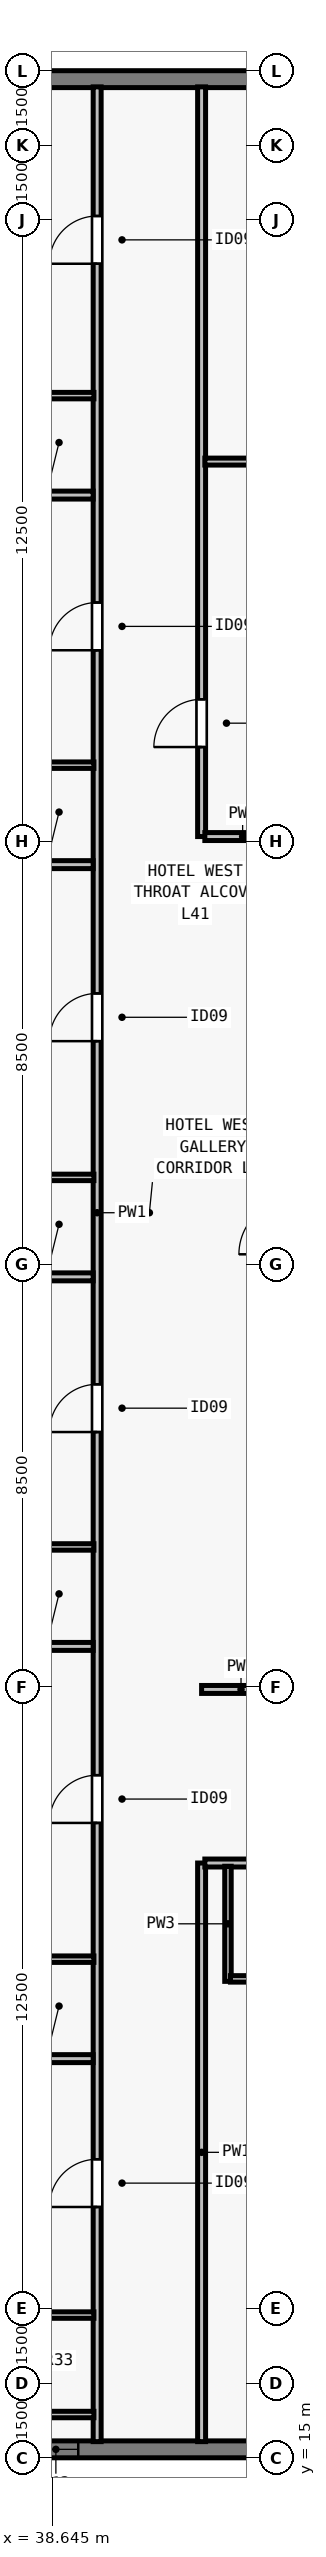
"""IFC4 building model, lengths in metres.
Left out: names, types, materials, properties, quantities, classifications, styles, units other than length and angle.
Written with IfcOpenShell. Run it as: python <this file> out.ifc"""

import sys

from ifc_helpers import new_model, si_unit, direction, frame, frame_2d, origin, place, context, subcontext, project, spatial, rectangle, extrude, element, fill, save


model = new_model("IFC4")
c1 = context("Model", 3, precision=1e-05, world=origin(), true_north=direction((0.0, 1.0)))
c2 = subcontext(c1, "Body", "Model", "MODEL_VIEW")
j1 = project(units=[si_unit("LENGTHUNIT", "METRE"), si_unit("PLANEANGLEUNIT", "RADIAN")], contexts=[c1])
p1 = place(None, origin())
s1 = spatial("IfcSite", under=j1, at=p1, CompositionType="ELEMENT")
p2 = place(p1, origin())
s2 = spatial("IfcBuilding", under=s1, at=p2, CompositionType="ELEMENT")
p3 = place(p2, frame((0.0, 0.0, 151.5)))
s3 = spatial("IfcBuildingStorey", under=s2, at=p3, CompositionType="ELEMENT", Elevation=151.5)
p4 = place(p3, frame((47.8, 15.17, 0.0), z_axis=(0.0, 0.0, 1.0), x_axis=(-1.0, 0.0, 0.0)))
e1 = element("IfcWall", 1, at=p4, inside=s3, PredefinedType="SOLIDWALL", context=c2, shape_type="SweptSolid", body=[
    extrude(rectangle(XDim=15.482, YDim=0.34, at=frame_2d((7.741, 0.0))), origin(), (0.0, 0.0, 1.0), 3.28),
])
p5 = place(p4, frame((2.105, 0.0, 0.8)))
e2 = element("IfcOpeningElement", 2, at=p5, cuts=e1, PredefinedType="OPENING", context=c2, shape_type="SweptSolid", body=[
    extrude(rectangle(XDim=1.75, YDim=1.66, at=frame_2d((0.875, 0.83))), frame((0.0, 0.18, 0.0), z_axis=(0.0, -1.0, 0.0), x_axis=(1.0, 0.0, 0.0)), (0.0, 0.0, 1.0), 0.36),
])
p6 = place(p4, frame((8.63, 0.0, 0.8)))
e3 = element("IfcOpeningElement", 3, at=p6, cuts=e1, PredefinedType="OPENING", context=c2, shape_type="SweptSolid", body=[
    extrude(rectangle(XDim=0.9, YDim=1.66, at=frame_2d((0.45, 0.83))), frame((0.0, 0.18, 0.0), z_axis=(0.0, -1.0, 0.0), x_axis=(1.0, 0.0, 0.0)), (0.0, 0.0, 1.0), 0.36),
])
p7 = place(p3, frame((32.0, 62.83, 0.0), z_axis=(0.0, 0.0, 1.0), x_axis=(1.0, 0.0, 0.0)))
e4 = element("IfcWall", 4, at=p7, inside=s3, PredefinedType="SOLIDWALL", context=c2, shape_type="SweptSolid", body=[
    extrude(rectangle(XDim=39.682, YDim=0.34, at=frame_2d((19.841, 0.0))), origin(), (0.0, 0.0, 1.0), 3.28),
])
p8 = place(p7, frame((4.752, 0.0, 0.8)))
e5 = element("IfcOpeningElement", 5, at=p8, cuts=e4, PredefinedType="OPENING", context=c2, shape_type="SweptSolid", body=[
    extrude(rectangle(XDim=1.75, YDim=1.66, at=frame_2d((0.875, 0.83))), frame((0.0, 0.18, 0.0), z_axis=(0.0, -1.0, 0.0), x_axis=(1.0, 0.0, 0.0)), (0.0, 0.0, 1.0), 0.36),
])
p9 = place(p7, frame((11.859, 0.0, 0.8)))
e6 = element("IfcOpeningElement", 6, at=p9, cuts=e4, PredefinedType="OPENING", context=c2, shape_type="SweptSolid", body=[
    extrude(rectangle(XDim=1.75, YDim=1.66, at=frame_2d((0.875, 0.83))), frame((0.0, 0.18, 0.0), z_axis=(0.0, -1.0, 0.0), x_axis=(1.0, 0.0, 0.0)), (0.0, 0.0, 1.0), 0.36),
])
p10 = place(p7, frame((16.062, 0.0, 0.8)))
e7 = element("IfcOpeningElement", 7, at=p10, cuts=e4, PredefinedType="OPENING", context=c2, shape_type="SweptSolid", body=[
    extrude(rectangle(XDim=1.35, YDim=1.66, at=frame_2d((0.675, 0.83))), frame((0.0, 0.18, 0.0), z_axis=(0.0, -1.0, 0.0), x_axis=(1.0, 0.0, 0.0)), (0.0, 0.0, 1.0), 0.36),
])
p11 = place(p7, frame((17.716, 0.0, 0.8)))
e8 = element("IfcOpeningElement", 8, at=p11, cuts=e4, PredefinedType="OPENING", context=c2, shape_type="SweptSolid", body=[
    extrude(rectangle(XDim=1.75, YDim=1.66, at=frame_2d((0.875, 0.83))), frame((0.0, 0.18, 0.0), z_axis=(0.0, -1.0, 0.0), x_axis=(1.0, 0.0, 0.0)), (0.0, 0.0, 1.0), 0.36),
])
p12 = place(p7, frame((22.719, 0.0, 0.8)))
e9 = element("IfcOpeningElement", 9, at=p12, cuts=e4, PredefinedType="OPENING", context=c2, shape_type="SweptSolid", body=[
    extrude(rectangle(XDim=1.35, YDim=1.66, at=frame_2d((0.675, 0.83))), frame((0.0, 0.18, 0.0), z_axis=(0.0, -1.0, 0.0), x_axis=(1.0, 0.0, 0.0)), (0.0, 0.0, 1.0), 0.36),
])
p13 = place(p7, frame((26.073, 0.0, 0.8)))
e10 = element("IfcOpeningElement", 10, at=p13, cuts=e4, PredefinedType="OPENING", context=c2, shape_type="SweptSolid", body=[
    extrude(rectangle(XDim=1.75, YDim=1.66, at=frame_2d((0.875, 0.83))), frame((0.0, 0.18, 0.0), z_axis=(0.0, -1.0, 0.0), x_axis=(1.0, 0.0, 0.0)), (0.0, 0.0, 1.0), 0.36),
])
p14 = place(p7, frame((29.827, 0.0, 0.8)))
e11 = element("IfcOpeningElement", 11, at=p14, cuts=e4, PredefinedType="OPENING", context=c2, shape_type="SweptSolid", body=[
    extrude(rectangle(XDim=1.35, YDim=1.66, at=frame_2d((0.675, 0.83))), frame((0.0, 0.18, 0.0), z_axis=(0.0, -1.0, 0.0), x_axis=(1.0, 0.0, 0.0)), (0.0, 0.0, 1.0), 0.36),
])
p15 = place(p3, frame((39.55, 15.325, 0.0), z_axis=(0.0, 0.0, 1.0), x_axis=(0.0, 1.0, 0.0)))
e12 = element("IfcWall", 12, at=p15, inside=s3, PredefinedType="PARTITIONING", context=c2, shape_type="SweptSolid", body=[
    extrude(rectangle(XDim=47.35, YDim=0.16, at=frame_2d((23.675, 0.0))), origin(), (0.0, 0.0, 1.0), 2.555),
])
p16 = place(p15, frame((4.718, 0.0, 0.0)))
e13 = element("IfcOpeningElement", 13, at=p16, cuts=e12, PredefinedType="OPENING", context=c2, shape_type="SweptSolid", body=[
    extrude(rectangle(XDim=0.96, YDim=2.15, at=frame_2d((0.48, 1.075))), frame((0.0, 0.09, 0.0), z_axis=(0.0, -1.0, 0.0), x_axis=(1.0, 0.0, 0.0)), (0.0, 0.0, 1.0), 0.18),
])
p17 = place(p15, frame((12.441, 0.0, 0.0)))
e14 = element("IfcOpeningElement", 14, at=p17, cuts=e12, PredefinedType="OPENING", context=c2, shape_type="SweptSolid", body=[
    extrude(rectangle(XDim=0.96, YDim=2.15, at=frame_2d((0.48, 1.075))), frame((0.0, 0.09, 0.0), z_axis=(0.0, -1.0, 0.0), x_axis=(1.0, 0.0, 0.0)), (0.0, 0.0, 1.0), 0.18),
])
p18 = place(p15, frame((20.301, 0.0, 0.0)))
e15 = element("IfcOpeningElement", 15, at=p18, cuts=e12, PredefinedType="OPENING", context=c2, shape_type="SweptSolid", body=[
    extrude(rectangle(XDim=0.96, YDim=2.15, at=frame_2d((0.48, 1.075))), frame((0.0, 0.09, 0.0), z_axis=(0.0, -1.0, 0.0), x_axis=(1.0, 0.0, 0.0)), (0.0, 0.0, 1.0), 0.18),
])
p19 = place(p15, frame((28.161, 0.0, 0.0)))
e16 = element("IfcOpeningElement", 16, at=p19, cuts=e12, PredefinedType="OPENING", context=c2, shape_type="SweptSolid", body=[
    extrude(rectangle(XDim=0.96, YDim=2.15, at=frame_2d((0.48, 1.075))), frame((0.0, 0.09, 0.0), z_axis=(0.0, -1.0, 0.0), x_axis=(1.0, 0.0, 0.0)), (0.0, 0.0, 1.0), 0.18),
])
p20 = place(p15, frame((36.021, 0.0, 0.0)))
e17 = element("IfcOpeningElement", 17, at=p20, cuts=e12, PredefinedType="OPENING", context=c2, shape_type="SweptSolid", body=[
    extrude(rectangle(XDim=0.96, YDim=2.15, at=frame_2d((0.48, 1.075))), frame((0.0, 0.09, 0.0), z_axis=(0.0, -1.0, 0.0), x_axis=(1.0, 0.0, 0.0)), (0.0, 0.0, 1.0), 0.18),
])
p21 = place(p15, frame((43.793, 0.0, 0.0)))
e18 = element("IfcOpeningElement", 18, at=p21, cuts=e12, PredefinedType="OPENING", context=c2, shape_type="SweptSolid", body=[
    extrude(rectangle(XDim=0.96, YDim=2.15, at=frame_2d((0.48, 1.075))), frame((0.0, 0.09, 0.0), z_axis=(0.0, -1.0, 0.0), x_axis=(1.0, 0.0, 0.0)), (0.0, 0.0, 1.0), 0.18),
])
p22 = place(p3, frame((41.65, 15.325, 0.0), z_axis=(0.0, 0.0, 1.0), x_axis=(0.0, 1.0, 0.0)))
e19 = element("IfcWall", 19, at=p22, inside=s3, PredefinedType="PARTITIONING", context=c2, shape_type="SweptSolid", body=[
    extrude(rectangle(XDim=11.635, YDim=0.16, at=frame_2d((5.817, 0.0))), origin(), (0.0, 0.0, 1.0), 3.28),
])
p23 = place(p3, frame((41.65, 47.6, 0.0), z_axis=(0.0, 0.0, 1.0), x_axis=(0.0, 1.0, 0.0)))
e20 = element("IfcWall", 20, at=p23, inside=s3, PredefinedType="PARTITIONING", context=c2, shape_type="SweptSolid", body=[
    extrude(rectangle(XDim=15.075, YDim=0.16, at=frame_2d((7.538, 0.0))), origin(), (0.0, 0.0, 1.0), 2.555),
])
p24 = place(p23, frame((1.8, 0.0, 0.0)))
e21 = element("IfcOpeningElement", 21, at=p24, cuts=e20, PredefinedType="OPENING", context=c2, shape_type="SweptSolid", body=[
    extrude(rectangle(XDim=0.96, YDim=2.12, at=frame_2d((0.48, 1.06))), frame((0.0, 0.09, 0.0), z_axis=(0.0, -1.0, 0.0), x_axis=(1.0, 0.0, 0.0)), (0.0, 0.0, 1.0), 0.18),
])
p25 = place(p3, frame((41.65, 30.45, 0.0), z_axis=(0.0, 0.0, 1.0), x_axis=(1.0, 0.0, 0.0)))
e22 = element("IfcWall", 22, at=p25, inside=s3, PredefinedType="PARTITIONING", context=c2, shape_type="SweptSolid", body=[
    extrude(rectangle(XDim=1.585, YDim=0.16, at=frame_2d((0.792, 0.0))), origin(), (0.0, 0.0, 1.0), 3.28),
])
p26 = place(p3, frame((41.715, 47.6, 0.0), z_axis=(0.0, 0.0, 1.0), x_axis=(1.0, 0.0, 0.0)))
e23 = element("IfcWall", 23, at=p26, inside=s3, PredefinedType="PARTITIONING", context=c2, shape_type="SweptSolid", body=[
    extrude(rectangle(XDim=1.52, YDim=0.16, at=frame_2d((0.76, 0.0))), origin(), (0.0, 0.0, 1.0), 3.28),
])
p27 = place(p3, frame((41.715, 26.96, 0.0), z_axis=(0.0, 0.0, 1.0), x_axis=(1.0, 0.0, 0.0)))
e24 = element("IfcWall", 24, at=p27, inside=s3, PredefinedType="PARTITIONING", context=c2, shape_type="SweptSolid", body=[
    extrude(rectangle(XDim=22.07, YDim=0.16, at=frame_2d((11.035, 0.0))), origin(), (0.0, 0.0, 1.0), 3.28),
])
p28 = place(p27, frame((6.15, 0.0, 0.0)))
e25 = element("IfcOpeningElement", 25, at=p28, cuts=e24, PredefinedType="OPENING", context=c2, shape_type="SweptSolid", body=[
    extrude(rectangle(XDim=0.96, YDim=2.15, at=frame_2d((0.48, 1.075))), frame((0.0, 0.09, 0.0), z_axis=(0.0, -1.0, 0.0), x_axis=(1.0, 0.0, 0.0)), (0.0, 0.0, 1.0), 0.18),
])
p29 = place(p27, frame((16.945, 0.0, 0.0)))
e26 = element("IfcOpeningElement", 26, at=p29, cuts=e24, PredefinedType="OPENING", context=c2, shape_type="SweptSolid", body=[
    extrude(rectangle(XDim=0.96, YDim=2.15, at=frame_2d((0.48, 1.075))), frame((0.0, 0.09, 0.0), z_axis=(0.0, -1.0, 0.0), x_axis=(1.0, 0.0, 0.0)), (0.0, 0.0, 1.0), 0.18),
])
p30 = place(p3, frame((41.715, 55.14, 0.0), z_axis=(0.0, 0.0, 1.0), x_axis=(1.0, 0.0, 0.0)))
e27 = element("IfcWall", 27, at=p30, inside=s3, PredefinedType="PARTITIONING", context=c2, shape_type="SweptSolid", body=[
    extrude(rectangle(XDim=22.07, YDim=0.14, at=frame_2d((11.035, 0.0))), origin(), (0.0, 0.0, 1.0), 3.28),
])
p31 = place(p30, frame((3.435, 0.0, 0.0)))
e28 = element("IfcOpeningElement", 28, at=p31, cuts=e27, PredefinedType="OPENING", context=c2, shape_type="SweptSolid", body=[
    extrude(rectangle(XDim=0.92, YDim=2.12, at=frame_2d((0.46, 1.06))), frame((0.0, 0.08, 0.0), z_axis=(0.0, -1.0, 0.0), x_axis=(1.0, 0.0, 0.0)), (0.0, 0.0, 1.0), 0.16),
])
p32 = place(p30, frame((14.435, 0.0, 0.0)))
e29 = element("IfcOpeningElement", 29, at=p32, cuts=e27, PredefinedType="OPENING", context=c2, shape_type="SweptSolid", body=[
    extrude(rectangle(XDim=0.92, YDim=2.12, at=frame_2d((0.46, 1.06))), frame((0.0, 0.08, 0.0), z_axis=(0.0, -1.0, 0.0), x_axis=(1.0, 0.0, 0.0)), (0.0, 0.0, 1.0), 0.16),
])
p33 = place(p3, frame((42.18, 24.58, 0.0), z_axis=(0.0, 0.0, 1.0), x_axis=(0.0, 1.0, 0.0)))
e30 = element("IfcWall", 30, at=p33, inside=s3, PredefinedType="PLUMBINGWALL", context=c2, shape_type="SweptSolid", body=[
    extrude(rectangle(XDim=2.315, YDim=0.13, at=frame_2d((1.157, 0.0))), origin(), (0.0, 0.0, 1.0), 3.28),
])
p34 = place(p3, frame((42.23, 24.63, 0.0), z_axis=(0.0, 0.0, 1.0), x_axis=(1.0, 0.0, 0.0)))
e31 = element("IfcWall", 31, at=p34, inside=s3, PredefinedType="PLUMBINGWALL", context=c2, shape_type="SweptSolid", body=[
    extrude(rectangle(XDim=1.9, YDim=0.13, at=frame_2d((0.95, 0.0))), origin(), (0.0, 0.0, 1.0), 3.28),
])
p35 = place(p34, frame((0.54, 0.0, 0.0)))
e32 = element("IfcOpeningElement", 32, at=p35, cuts=e31, PredefinedType="OPENING", context=c2, shape_type="SweptSolid", body=[
    extrude(rectangle(XDim=0.82, YDim=2.1, at=frame_2d((0.41, 1.05))), frame((0.0, 0.075, 0.0), z_axis=(0.0, -1.0, 0.0), x_axis=(1.0, 0.0, 0.0)), (0.0, 0.0, 1.0), 0.15),
])
for number, where, z_axis, x_axis in (
    (33, (37.17, 15.87, 0.0), (0.0, 0.0, 1.0), (1.0, 0.0, 0.0)),
    (34, (37.17, 17.87, 0.0), (0.0, 0.0, 1.0), (1.0, 0.0, 0.0)),
):
    element("IfcWall", number, at=place(p3, frame(where, z_axis=z_axis, x_axis=x_axis)), inside=s3, PredefinedType="PLUMBINGWALL", context=c2, shape_type="SweptSolid", body=[
        extrude(rectangle(XDim=2.315, YDim=0.13, at=frame_2d((1.158, 0.0))), origin(), (0.0, 0.0, 1.0), 3.28),
    ])
p36 = place(p3, frame((28.325, 23.027, 0.0), z_axis=(0.0, 0.0, 1.0), x_axis=(1.0, 0.0, 0.0)))
e35 = element("IfcWall", 35, at=p36, inside=s3, PredefinedType="PARTITIONING", context=c2, shape_type="SweptSolid", body=[
    extrude(rectangle(XDim=11.145, YDim=0.16, at=frame_2d((5.573, 0.0))), origin(), (0.0, 0.0, 1.0), 2.896),
])
p37 = place(p3, frame((37.17, 25.027, 0.0), z_axis=(0.0, 0.0, 1.0), x_axis=(1.0, 0.0, 0.0)))
e36 = element("IfcWall", 36, at=p37, inside=s3, PredefinedType="PLUMBINGWALL", context=c2, shape_type="SweptSolid", body=[
    extrude(rectangle(XDim=2.315, YDim=0.13, at=frame_2d((1.158, 0.0))), origin(), (0.0, 0.0, 1.0), 3.28),
])
p38 = place(p3, frame((28.325, 31.315, 0.0), z_axis=(0.0, 0.0, 1.0), x_axis=(1.0, 0.0, 0.0)))
e37 = element("IfcWall", 37, at=p38, inside=s3, PredefinedType="PARTITIONING", context=c2, shape_type="SweptSolid", body=[
    extrude(rectangle(XDim=11.145, YDim=0.16, at=frame_2d((5.573, 0.0))), origin(), (0.0, 0.0, 1.0), 3.28),
])
p39 = place(p3, frame((37.17, 33.315, 0.0), z_axis=(0.0, 0.0, 1.0), x_axis=(1.0, 0.0, 0.0)))
e38 = element("IfcWall", 38, at=p39, inside=s3, PredefinedType="PLUMBINGWALL", context=c2, shape_type="SweptSolid", body=[
    extrude(rectangle(XDim=2.315, YDim=0.13, at=frame_2d((1.158, 0.0))), origin(), (0.0, 0.0, 1.0), 3.28),
])
p40 = place(p3, frame((28.325, 38.747, 0.0), z_axis=(0.0, 0.0, 1.0), x_axis=(1.0, 0.0, 0.0)))
e39 = element("IfcWall", 39, at=p40, inside=s3, PredefinedType="PARTITIONING", context=c2, shape_type="SweptSolid", body=[
    extrude(rectangle(XDim=11.145, YDim=0.16, at=frame_2d((5.573, 0.0))), origin(), (0.0, 0.0, 1.0), 2.896),
])
p41 = place(p3, frame((37.17, 40.747, 0.0), z_axis=(0.0, 0.0, 1.0), x_axis=(1.0, 0.0, 0.0)))
e40 = element("IfcWall", 40, at=p41, inside=s3, PredefinedType="PLUMBINGWALL", context=c2, shape_type="SweptSolid", body=[
    extrude(rectangle(XDim=2.315, YDim=0.13, at=frame_2d((1.158, 0.0))), origin(), (0.0, 0.0, 1.0), 3.28),
])
p42 = place(p3, frame((28.325, 47.035, 0.0), z_axis=(0.0, 0.0, 1.0), x_axis=(1.0, 0.0, 0.0)))
e41 = element("IfcWall", 41, at=p42, inside=s3, PredefinedType="PARTITIONING", context=c2, shape_type="SweptSolid", body=[
    extrude(rectangle(XDim=11.145, YDim=0.16, at=frame_2d((5.573, 0.0))), origin(), (0.0, 0.0, 1.0), 3.28),
])
p43 = place(p3, frame((37.17, 49.035, 0.0), z_axis=(0.0, 0.0, 1.0), x_axis=(1.0, 0.0, 0.0)))
e42 = element("IfcWall", 42, at=p43, inside=s3, PredefinedType="PLUMBINGWALL", context=c2, shape_type="SweptSolid", body=[
    extrude(rectangle(XDim=2.315, YDim=0.13, at=frame_2d((1.158, 0.0))), origin(), (0.0, 0.0, 1.0), 3.28),
])
p44 = place(p3, frame((28.325, 54.467, 0.0), z_axis=(0.0, 0.0, 1.0), x_axis=(1.0, 0.0, 0.0)))
e43 = element("IfcWall", 43, at=p44, inside=s3, PredefinedType="PARTITIONING", context=c2, shape_type="SweptSolid", body=[
    extrude(rectangle(XDim=11.145, YDim=0.16, at=frame_2d((5.573, 0.0))), origin(), (0.0, 0.0, 1.0), 2.896),
])
p45 = place(p3, frame((37.17, 56.467, 0.0), z_axis=(0.0, 0.0, 1.0), x_axis=(1.0, 0.0, 0.0)))
e44 = element("IfcWall", 44, at=p45, inside=s3, PredefinedType="PLUMBINGWALL", context=c2, shape_type="SweptSolid", body=[
    extrude(rectangle(XDim=2.315, YDim=0.13, at=frame_2d((1.158, 0.0))), origin(), (0.0, 0.0, 1.0), 3.28),
])
p46 = place(p6, origin())
e45 = element("IfcWindow", 45, at=p46, inside=s3, PartitioningType="SINGLE_PANEL", PredefinedType="WINDOW", context=c2, shape_type="SweptSolid", body=[
    extrude(rectangle(XDim=0.9, YDim=1.66, at=frame_2d((0.45, 0.83))), frame((0.0, -0.04, 0.0), z_axis=(0.0, -1.0, 0.0), x_axis=(1.0, 0.0, 0.0)), (0.0, 0.0, 1.0), 0.06),
])
fill(e3, e45)
p47 = place(p24, origin())
e46 = element("IfcDoor", 46, at=p47, inside=s3, OperationType="SINGLE_SWING_LEFT", PredefinedType="DOOR", context=c2, shape_type="SweptSolid", body=[
    extrude(rectangle(XDim=0.96, YDim=2.12, at=frame_2d((0.48, 1.06))), frame((0.0, 0.025, 0.0), z_axis=(0.0, -1.0, 0.0), x_axis=(1.0, 0.0, 0.0)), (0.0, 0.0, 1.0), 0.05),
])
fill(e21, e46)
p48 = place(p16, origin())
e47 = element("IfcDoor", 47, at=p48, inside=s3, OperationType="SINGLE_SWING_LEFT", PredefinedType="DOOR", context=c2, shape_type="SweptSolid", body=[
    extrude(rectangle(XDim=0.96, YDim=2.15, at=frame_2d((0.48, 1.075))), frame((0.0, 0.025, 0.0), z_axis=(0.0, -1.0, 0.0), x_axis=(1.0, 0.0, 0.0)), (0.0, 0.0, 1.0), 0.05),
])
fill(e13, e47)
p49 = place(p17, origin())
e48 = element("IfcDoor", 48, at=p49, inside=s3, OperationType="SINGLE_SWING_LEFT", PredefinedType="DOOR", context=c2, shape_type="SweptSolid", body=[
    extrude(rectangle(XDim=0.96, YDim=2.15, at=frame_2d((0.48, 1.075))), frame((0.0, 0.025, 0.0), z_axis=(0.0, -1.0, 0.0), x_axis=(1.0, 0.0, 0.0)), (0.0, 0.0, 1.0), 0.05),
])
fill(e14, e48)
p50 = place(p18, origin())
e49 = element("IfcDoor", 49, at=p50, inside=s3, OperationType="SINGLE_SWING_LEFT", PredefinedType="DOOR", context=c2, shape_type="SweptSolid", body=[
    extrude(rectangle(XDim=0.96, YDim=2.15, at=frame_2d((0.48, 1.075))), frame((0.0, 0.025, 0.0), z_axis=(0.0, -1.0, 0.0), x_axis=(1.0, 0.0, 0.0)), (0.0, 0.0, 1.0), 0.05),
])
fill(e15, e49)
p51 = place(p19, origin())
e50 = element("IfcDoor", 50, at=p51, inside=s3, OperationType="SINGLE_SWING_LEFT", PredefinedType="DOOR", context=c2, shape_type="SweptSolid", body=[
    extrude(rectangle(XDim=0.96, YDim=2.15, at=frame_2d((0.48, 1.075))), frame((0.0, 0.025, 0.0), z_axis=(0.0, -1.0, 0.0), x_axis=(1.0, 0.0, 0.0)), (0.0, 0.0, 1.0), 0.05),
])
fill(e16, e50)
p52 = place(p20, origin())
e51 = element("IfcDoor", 51, at=p52, inside=s3, OperationType="SINGLE_SWING_LEFT", PredefinedType="DOOR", context=c2, shape_type="SweptSolid", body=[
    extrude(rectangle(XDim=0.96, YDim=2.15, at=frame_2d((0.48, 1.075))), frame((0.0, 0.025, 0.0), z_axis=(0.0, -1.0, 0.0), x_axis=(1.0, 0.0, 0.0)), (0.0, 0.0, 1.0), 0.05),
])
fill(e17, e51)
p53 = place(p21, origin())
e52 = element("IfcDoor", 52, at=p53, inside=s3, OperationType="SINGLE_SWING_LEFT", PredefinedType="DOOR", context=c2, shape_type="SweptSolid", body=[
    extrude(rectangle(XDim=0.96, YDim=2.15, at=frame_2d((0.48, 1.075))), frame((0.0, 0.025, 0.0), z_axis=(0.0, -1.0, 0.0), x_axis=(1.0, 0.0, 0.0)), (0.0, 0.0, 1.0), 0.05),
])
fill(e18, e52)
save(model, sys.argv[1])
